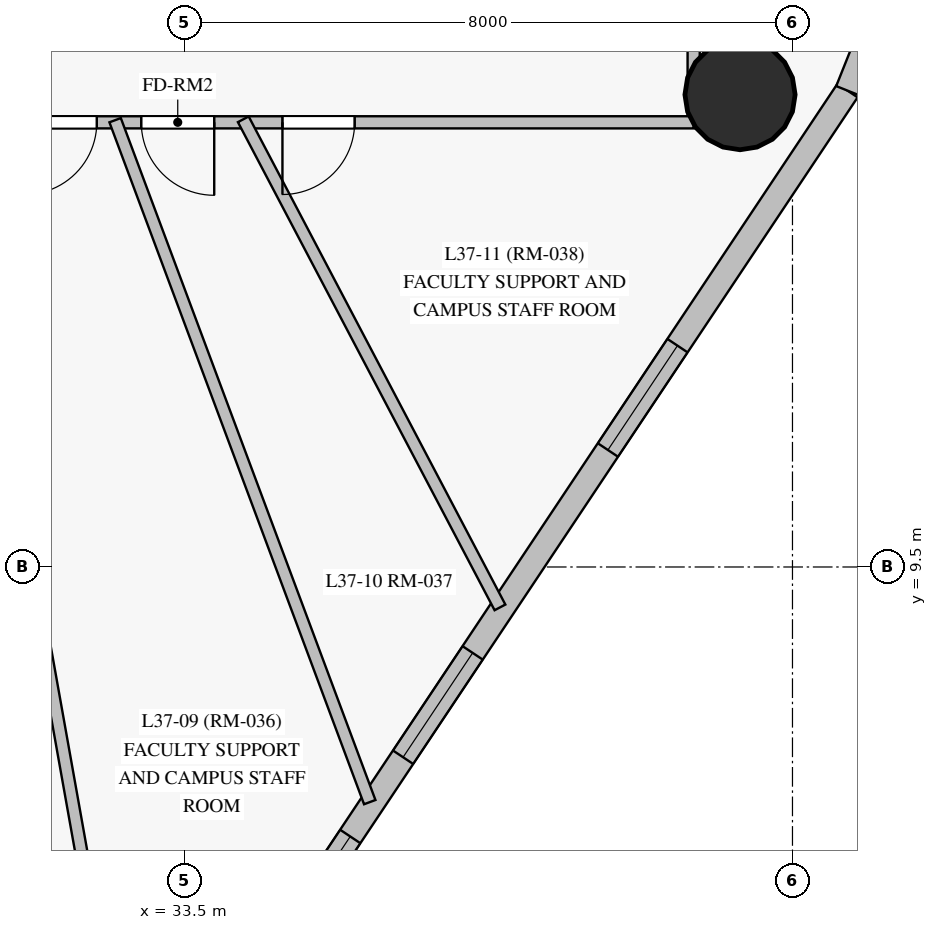
"""IFC4 building model, lengths in metres.
Left out: names, types, materials, properties, quantities, classifications, styles, units other than length and angle.
Written with IfcOpenShell. Run it as: python <this file> out.ifc"""

import sys

from ifc_helpers import new_model, si_unit, direction, frame, frame_2d, origin, origin_with_axes, origin_2d, place, context, subcontext, project, spatial, rectangle, circle, extrude, source, transform, mapped, element, fill, save


model = new_model("IFC4")
c1 = context("Model", 3, precision=1e-05, world=origin(), true_north=direction((0.0, 1.0)))
c2 = subcontext(c1, "Body", "Model", "MODEL_VIEW")
j1 = project(units=[si_unit("LENGTHUNIT", "METRE"), si_unit("PLANEANGLEUNIT", "RADIAN")], contexts=[c1])
p1 = place(None, origin())
s1 = spatial("IfcSite", under=j1, at=p1, CompositionType="ELEMENT")
p2 = place(p1, origin())
s2 = spatial("IfcBuilding", under=s1, at=p2, CompositionType="ELEMENT")
p3 = place(p2, frame((0.0, 0.0, 132.8)))
s3 = spatial("IfcBuildingStorey", under=s2, at=p3, CompositionType="ELEMENT", Elevation=132.8)
m1 = source(origin_with_axes(), c2, "Body", "SweptSolid", [
    extrude(circle(Radius=0.725, at=origin_2d()), origin(), (0.0, 0.0, 1.0), 3.05),
])
p4 = place(p3, frame((40.81, 15.714, 0.0), z_axis=(0.0, 0.0, 1.0), x_axis=(1.0, 0.0, 0.0)))
e1 = element("IfcColumn", 1, at=p4, inside=s3, PredefinedType="COLUMN", context=c2, shape_type="MappedRepresentation", body=[
    mapped(m1, transform((0.0, 0.0, 0.0), scale=1.0)),
])
p5 = place(p3, frame((34.435, 4.083, 0.0), z_axis=(0.0, 0.0, 1.0), x_axis=(0.554696184095, 0.832052969077, 0.0)))
e2 = element("IfcWall", 2, at=p5, inside=s3, PredefinedType="SOLIDWALL", context=c2, shape_type="SweptSolid", body=[
    extrude(rectangle(XDim=14.042, YDim=0.32, at=frame_2d((7.021, 0.0))), origin(), (0.0, 0.0, 1.0), 2.825),
])
p6 = place(p5, frame((0.599, 0.0, 0.85)))
e3 = element("IfcOpeningElement", 3, at=p6, cuts=e2, PredefinedType="OPENING", context=c2, shape_type="SweptSolid", body=[
    extrude(rectangle(XDim=1.65, YDim=1.65, at=frame_2d((0.825, 0.825))), frame((0.0, 0.17, 0.0), z_axis=(0.0, -1.0, 0.0), x_axis=(1.0, 0.0, 0.0)), (0.0, 0.0, 1.0), 0.34),
])
p7 = place(p5, frame((3.502, 0.0, 0.85)))
e4 = element("IfcOpeningElement", 4, at=p7, cuts=e2, PredefinedType="OPENING", context=c2, shape_type="SweptSolid", body=[
    extrude(rectangle(XDim=1.65, YDim=1.65, at=frame_2d((0.825, 0.825))), frame((0.0, 0.17, 0.0), z_axis=(0.0, -1.0, 0.0), x_axis=(1.0, 0.0, 0.0)), (0.0, 0.0, 1.0), 0.34),
])
p8 = place(p5, frame((8.36, 0.0, 0.85)))
e5 = element("IfcOpeningElement", 5, at=p8, cuts=e2, PredefinedType="OPENING", context=c2, shape_type="SweptSolid", body=[
    extrude(rectangle(XDim=1.65, YDim=1.65, at=frame_2d((0.825, 0.825))), frame((0.0, 0.17, 0.0), z_axis=(0.0, -1.0, 0.0), x_axis=(1.0, 0.0, 0.0)), (0.0, 0.0, 1.0), 0.34),
])
p9 = place(p3, frame((42.224, 15.767, 0.0), z_axis=(0.0, 0.0, 1.0), x_axis=(0.37072212122, 0.928743833809, 0.0)))
e6 = element("IfcWall", 6, at=p9, inside=s3, PredefinedType="SOLIDWALL", context=c2, shape_type="SweptSolid", body=[
    extrude(rectangle(XDim=9.76, YDim=0.32, at=frame_2d((4.88, 0.0))), origin(), (0.0, 0.0, 1.0), 2.825),
])
p10 = place(p9, frame((0.737, 0.0, 0.85)))
e7 = element("IfcOpeningElement", 7, at=p10, cuts=e6, PredefinedType="OPENING", context=c2, shape_type="SweptSolid", body=[
    extrude(rectangle(XDim=1.65, YDim=1.65, at=frame_2d((0.825, 0.825))), frame((0.0, 0.17, 0.0), z_axis=(0.0, -1.0, 0.0), x_axis=(1.0, 0.0, 0.0)), (0.0, 0.0, 1.0), 0.34),
])
p11 = place(p9, frame((6.267, 0.0, 0.85)))
e8 = element("IfcOpeningElement", 8, at=p11, cuts=e6, PredefinedType="OPENING", context=c2, shape_type="SweptSolid", body=[
    extrude(rectangle(XDim=1.65, YDim=1.65, at=frame_2d((0.825, 0.825))), frame((0.0, 0.17, 0.0), z_axis=(0.0, -1.0, 0.0), x_axis=(1.0, 0.0, 0.0)), (0.0, 0.0, 1.0), 0.34),
])
p12 = place(p3, frame((40.2, 37.65, 0.0), z_axis=(0.0, 0.0, 1.0), x_axis=(0.0, -1.0, 0.0)))
e9 = element("IfcWall", 9, at=p12, inside=s3, PredefinedType="PARTITIONING", context=c2, shape_type="SweptSolid", body=[
    extrude(rectangle(XDim=22.3, YDim=0.16, at=frame_2d((11.15, 0.0))), origin(), (0.0, 0.0, 1.0), 2.325),
])
p13 = place(p12, frame((14.02, 0.0, 0.0)))
e10 = element("IfcOpeningElement", 10, at=p13, cuts=e9, PredefinedType="OPENING", context=c2, shape_type="SweptSolid", body=[
    extrude(rectangle(XDim=0.95, YDim=2.15, at=frame_2d((0.475, 1.075))), frame((0.0, 0.09, 0.0), z_axis=(0.0, -1.0, 0.0), x_axis=(1.0, 0.0, 0.0)), (0.0, 0.0, 1.0), 0.18),
])
p14 = place(p12, frame((10.185, 0.0, 0.0)))
e11 = element("IfcOpeningElement", 11, at=p14, cuts=e9, PredefinedType="OPENING", context=c2, shape_type="SweptSolid", body=[
    extrude(rectangle(XDim=0.96, YDim=2.15, at=frame_2d((0.48, 1.075))), frame((0.0, 0.09, 0.0), z_axis=(0.0, -1.0, 0.0), x_axis=(1.0, 0.0, 0.0)), (0.0, 0.0, 1.0), 0.18),
])
p15 = place(p12, frame((7.33, 0.0, 0.0)))
e12 = element("IfcOpeningElement", 12, at=p15, cuts=e9, PredefinedType="OPENING", context=c2, shape_type="SweptSolid", body=[
    extrude(rectangle(XDim=0.95, YDim=2.15, at=frame_2d((0.475, 1.075))), frame((0.0, 0.09, 0.0), z_axis=(0.0, -1.0, 0.0), x_axis=(1.0, 0.0, 0.0)), (0.0, 0.0, 1.0), 0.18),
])
p16 = place(p12, frame((2.846, 0.0, 0.0)))
e13 = element("IfcOpeningElement", 13, at=p16, cuts=e9, PredefinedType="OPENING", context=c2, shape_type="SweptSolid", body=[
    extrude(rectangle(XDim=0.95, YDim=2.15, at=frame_2d((0.475, 1.075))), frame((0.0, 0.09, 0.0), z_axis=(0.0, -1.0, 0.0), x_axis=(1.0, 0.0, 0.0)), (0.0, 0.0, 1.0), 0.18),
])
p17 = place(p3, frame((30.425, 15.379, 0.0), z_axis=(0.0, 0.0, 1.0), x_axis=(0.175767251586, -0.984431751454, 0.0)))
e14 = element("IfcWall", 14, at=p17, inside=s3, PredefinedType="PARTITIONING", context=c2, shape_type="SweptSolid", body=[
    extrude(rectangle(XDim=11.923, YDim=0.16, at=frame_2d((5.961, 0.0))), origin(), (0.0, 0.0, 1.0), 2.825),
])
p18 = place(p3, frame((40.2, 15.35, 0.0), z_axis=(0.0, 0.0, 1.0), x_axis=(-1.0, 0.0, 0.0)))
e15 = element("IfcWall", 15, at=p18, inside=s3, PredefinedType="PARTITIONING", context=c2, shape_type="SweptSolid", body=[
    extrude(rectangle(XDim=10.65, YDim=0.16, at=frame_2d((5.325, 0.0))), origin(), (0.0, 0.0, 1.0), 2.225),
])
p19 = place(p18, frame((7.853, 0.0, 0.0)))
e16 = element("IfcOpeningElement", 16, at=p19, cuts=e15, PredefinedType="OPENING", context=c2, shape_type="SweptSolid", body=[
    extrude(rectangle(XDim=0.95, YDim=2.15, at=frame_2d((0.475, 1.075))), frame((0.0, 0.09, 0.0), z_axis=(0.0, -1.0, 0.0), x_axis=(1.0, 0.0, 0.0)), (0.0, 0.0, 1.0), 0.18),
])
p20 = place(p18, frame((6.308, 0.0, 0.0)))
e17 = element("IfcOpeningElement", 17, at=p20, cuts=e15, PredefinedType="OPENING", context=c2, shape_type="SweptSolid", body=[
    extrude(rectangle(XDim=0.96, YDim=2.15, at=frame_2d((0.48, 1.075))), frame((0.0, 0.09, 0.0), z_axis=(0.0, -1.0, 0.0), x_axis=(1.0, 0.0, 0.0)), (0.0, 0.0, 1.0), 0.18),
])
p21 = place(p18, frame((4.46, 0.0, 0.0)))
e18 = element("IfcOpeningElement", 18, at=p21, cuts=e15, PredefinedType="OPENING", context=c2, shape_type="SweptSolid", body=[
    extrude(rectangle(XDim=0.95, YDim=2.15, at=frame_2d((0.475, 1.075))), frame((0.0, 0.09, 0.0), z_axis=(0.0, -1.0, 0.0), x_axis=(1.0, 0.0, 0.0)), (0.0, 0.0, 1.0), 0.18),
])
p22 = place(p3, frame((32.589, 15.378, 0.0), z_axis=(0.0, 0.0, 1.0), x_axis=(0.349793246399, -0.936826923596, 0.0)))
e19 = element("IfcWall", 19, at=p22, inside=s3, PredefinedType="PARTITIONING", context=c2, shape_type="SweptSolid", body=[
    extrude(rectangle(XDim=9.577, YDim=0.16, at=frame_2d((4.788, 0.0))), origin(), (0.0, 0.0, 1.0), 2.825),
])
p23 = place(p3, frame((34.275, 15.39, 0.0), z_axis=(0.0, 0.0, 1.0), x_axis=(0.465452385809, -0.885072921597, 0.0)))
e20 = element("IfcWall", 20, at=p23, inside=s3, PredefinedType="PARTITIONING", context=c2, shape_type="SweptSolid", body=[
    extrude(rectangle(XDim=7.255, YDim=0.16, at=frame_2d((3.627, 0.0))), origin(), (0.0, 0.0, 1.0), 2.825),
])
m2 = source(origin_with_axes(), c2, "Body", "SweptSolid", [
    extrude(rectangle(XDim=1.65, YDim=1.65, at=frame_2d((0.825, 0.825))), frame((0.0, 0.03, 0.0), z_axis=(0.0, -1.0, 0.0), x_axis=(1.0, 0.0, 0.0)), (0.0, 0.0, 1.0), 0.06),
])
p24 = place(p6, origin())
e21 = element("IfcWindow", 21, at=p24, inside=s3, PartitioningType="SINGLE_PANEL", PredefinedType="WINDOW", context=c2, shape_type="MappedRepresentation", body=[
    mapped(m2, transform((0.0, 0.0, 0.0), scale=1.0)),
])
fill(e3, e21)
p25 = place(p7, origin())
e22 = element("IfcWindow", 22, at=p25, inside=s3, PartitioningType="SINGLE_PANEL", PredefinedType="WINDOW", context=c2, shape_type="MappedRepresentation", body=[
    mapped(m2, transform((0.0, 0.0, 0.0), scale=1.0)),
])
fill(e4, e22)
p26 = place(p8, origin())
e23 = element("IfcWindow", 23, at=p26, inside=s3, PartitioningType="SINGLE_PANEL", PredefinedType="WINDOW", context=c2, shape_type="MappedRepresentation", body=[
    mapped(m2, transform((0.0, 0.0, 0.0), scale=1.0)),
])
fill(e5, e23)
m3 = source(origin_with_axes(), c2, "Body", "SweptSolid", [
    extrude(rectangle(XDim=0.95, YDim=2.15, at=frame_2d((0.475, 1.075))), frame((0.0, 0.025, 0.0), z_axis=(0.0, -1.0, 0.0), x_axis=(1.0, 0.0, 0.0)), (0.0, 0.0, 1.0), 0.05),
])
p27 = place(p19, origin())
e24 = element("IfcDoor", 24, at=p27, inside=s3, OperationType="SINGLE_SWING_RIGHT", PredefinedType="DOOR", context=c2, shape_type="MappedRepresentation", body=[
    mapped(m3, transform((0.0, 0.0, 0.0), scale=1.0)),
])
fill(e16, e24)
m4 = source(origin_with_axes(), c2, "Body", "SweptSolid", [
    extrude(rectangle(XDim=0.96, YDim=2.15, at=frame_2d((0.48, 1.075))), frame((0.0, 0.025, 0.0), z_axis=(0.0, -1.0, 0.0), x_axis=(1.0, 0.0, 0.0)), (0.0, 0.0, 1.0), 0.05),
])
p28 = place(p20, origin())
e25 = element("IfcDoor", 25, at=p28, inside=s3, OperationType="SINGLE_SWING_LEFT", PredefinedType="DOOR", context=c2, shape_type="MappedRepresentation", body=[
    mapped(m4, transform((0.0, 0.0, 0.0), scale=1.0)),
])
fill(e17, e25)
p29 = place(p21, origin())
e26 = element("IfcDoor", 26, at=p29, inside=s3, OperationType="SINGLE_SWING_RIGHT", PredefinedType="DOOR", context=c2, shape_type="MappedRepresentation", body=[
    mapped(m3, transform((0.0, 0.0, 0.0), scale=1.0)),
])
fill(e18, e26)
save(model, sys.argv[1])
